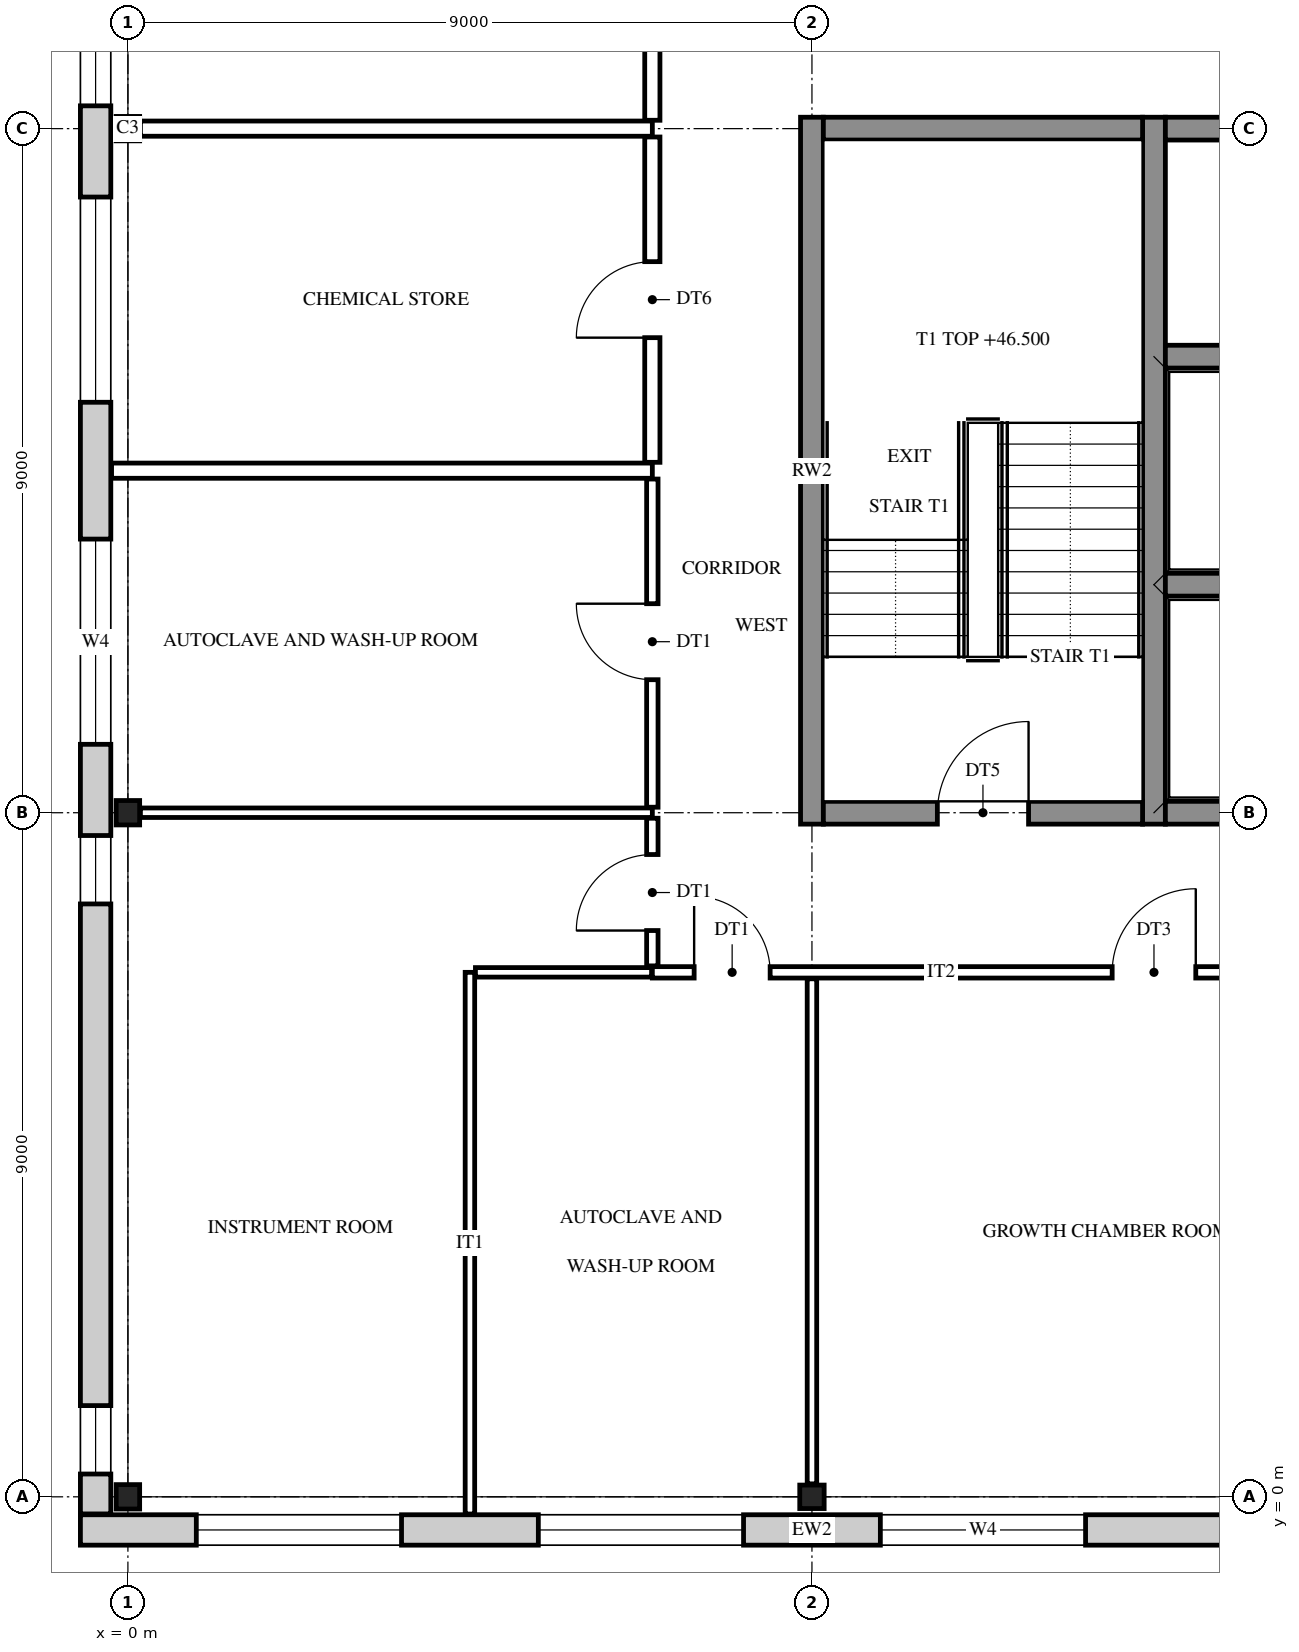
"""IFC4 building model, lengths in metres.
Left out: names, types, materials, properties, quantities, classifications, styles, units other than length and angle.
Written with IfcOpenShell. Run it as: python <this file> out.ifc"""

import sys

from ifc_helpers import new_model, si_unit, direction, frame, frame_2d, origin, origin_2d, place, context, subcontext, project, spatial, rectangle, i_section, extrude, element, fill, save


model = new_model("IFC4")
c1 = context("Model", 3, precision=1e-05, world=origin(), true_north=direction((0.0, 1.0)))
c2 = subcontext(c1, "Body", "Model", "MODEL_VIEW")
j1 = project(units=[si_unit("LENGTHUNIT", "METRE"), si_unit("PLANEANGLEUNIT", "RADIAN")], contexts=[c1])
p1 = place(None, origin())
s1 = spatial("IfcSite", under=j1, at=p1, CompositionType="ELEMENT")
p2 = place(p1, origin())
s2 = spatial("IfcBuilding", under=s1, at=p2, CompositionType="ELEMENT")
p3 = place(p2, frame((0.0, 0.0, 44.4)))
s3 = spatial("IfcBuildingStorey", under=s2, at=p3, CompositionType="ELEMENT", Elevation=44.4)
for number, where, z_axis, x_axis in (
    (1, (0.0, 0.0, 0.0), (0.0, 0.0, 1.0), (1.0, 0.0, 0.0)),
    (2, (0.0, 9.0, 0.0), (0.0, 0.0, 1.0), (1.0, 0.0, 0.0)),
    (3, (0.0, 18.0, 0.0), (0.0, 0.0, 1.0), (1.0, 0.0, 0.0)),
    (4, (9.0, 0.0, 0.0), (0.0, 0.0, 1.0), (0.0, 1.0, 0.0)),
):
    element("IfcColumn", number, at=place(p3, frame(where, z_axis=z_axis, x_axis=x_axis)), inside=s3, PredefinedType="COLUMN", context=c2, shape_type="SweptSolid", body=[
        extrude(i_section(OverallWidth=0.309, OverallDepth=0.321, WebThickness=0.014, FlangeThickness=0.022, FilletRadius=0.017, at=origin_2d()), origin(), (0.0, 0.0, 1.0), 4.2),
    ])
for number, where, z_axis, x_axis in (
    (5, (9.0, 8.85, 0.0), (0.0, 0.0, 1.0), (0.0, 1.0, 0.0)),
    (6, (13.5, 8.85, 0.0), (0.0, 0.0, 1.0), (0.0, 1.0, 0.0)),
):
    element("IfcWall", number, at=place(p3, frame(where, z_axis=z_axis, x_axis=x_axis)), inside=s3, PredefinedType="SHEAR", context=c2, shape_type="SweptSolid", body=[
        extrude(rectangle(XDim=9.3, YDim=0.3, at=frame_2d((4.65, 0.0))), origin(), (0.0, 0.0, 1.0), 4.2),
    ])
p4 = place(p3, frame((9.15, 9.0, 0.0), z_axis=(0.0, 0.0, 1.0), x_axis=(1.0, 0.0, 0.0)))
e7 = element("IfcWall", 7, at=p4, inside=s3, PredefinedType="SHEAR", context=c2, shape_type="SweptSolid", body=[
    extrude(rectangle(XDim=4.2, YDim=0.3, at=frame_2d((2.1, 0.0))), origin(), (0.0, 0.0, 1.0), 4.2),
])
p5 = place(p4, frame((1.5, 0.0, 0.0)))
e8 = element("IfcOpeningElement", 8, at=p5, cuts=e7, PredefinedType="OPENING", context=c2, shape_type="SweptSolid", body=[
    extrude(rectangle(XDim=1.2, YDim=2.1, at=frame_2d((0.6, 1.05))), frame((0.0, 0.16, 0.0), z_axis=(0.0, -1.0, 0.0), x_axis=(1.0, 0.0, 0.0)), (0.0, 0.0, 1.0), 0.32),
])
for number, where, z_axis, x_axis in (
    (9, (13.65, 9.0, 0.0), (0.0, 0.0, 1.0), (1.0, 0.0, 0.0)),
    (10, (13.65, 12.0, 0.0), (0.0, 0.0, 1.0), (1.0, 0.0, 0.0)),
    (11, (13.65, 15.0, 0.0), (0.0, 0.0, 1.0), (1.0, 0.0, 0.0)),
):
    element("IfcWall", number, at=place(p3, frame(where, z_axis=z_axis, x_axis=x_axis)), inside=s3, PredefinedType="SHEAR", context=c2, shape_type="SweptSolid", body=[
        extrude(rectangle(XDim=2.7, YDim=0.3, at=frame_2d((1.35, 0.0))), origin(), (0.0, 0.0, 1.0), 4.2),
    ])
p6 = place(p3, frame((9.15, 18.0, 0.0), z_axis=(0.0, 0.0, 1.0), x_axis=(1.0, 0.0, 0.0)))
e12 = element("IfcWall", 12, at=p6, inside=s3, PredefinedType="SHEAR", context=c2, shape_type="SweptSolid", body=[
    extrude(rectangle(XDim=4.2, YDim=0.3, at=frame_2d((2.1, 0.0))), origin(), (0.0, 0.0, 1.0), 4.2),
])
p7 = place(p3, frame((13.65, 18.0, 0.0), z_axis=(0.0, 0.0, 1.0), x_axis=(1.0, 0.0, 0.0)))
e13 = element("IfcWall", 13, at=p7, inside=s3, PredefinedType="SHEAR", context=c2, shape_type="SweptSolid", body=[
    extrude(rectangle(XDim=2.7, YDim=0.3, at=frame_2d((1.35, 0.0))), origin(), (0.0, 0.0, 1.0), 4.2),
])
p8 = place(p3, frame((32.125, -0.436, 0.0), z_axis=(0.0, 0.0, 1.0), x_axis=(-1.0, 0.0, 0.0)))
e14 = element("IfcWall", 14, at=p8, inside=s3, PredefinedType="STANDARD", context=c2, shape_type="SweptSolid", body=[
    extrude(rectangle(XDim=32.75, YDim=0.4, at=frame_2d((16.375, 0.0))), origin(), (0.0, 0.0, 1.0), 4.2),
])
p9 = place(p8, frame((28.525, 0.0, 0.9)))
e15 = element("IfcOpeningElement", 15, at=p9, cuts=e14, PredefinedType="OPENING", context=c2, shape_type="SweptSolid", body=[
    extrude(rectangle(XDim=2.7, YDim=2.5, at=frame_2d((1.35, 1.25))), frame((0.0, 0.21, 0.0), z_axis=(0.0, -1.0, 0.0), x_axis=(1.0, 0.0, 0.0)), (0.0, 0.0, 1.0), 0.42),
])
p10 = place(p8, frame((24.025, 0.0, 0.9)))
e16 = element("IfcOpeningElement", 16, at=p10, cuts=e14, PredefinedType="OPENING", context=c2, shape_type="SweptSolid", body=[
    extrude(rectangle(XDim=2.7, YDim=2.5, at=frame_2d((1.35, 1.25))), frame((0.0, 0.21, 0.0), z_axis=(0.0, -1.0, 0.0), x_axis=(1.0, 0.0, 0.0)), (0.0, 0.0, 1.0), 0.42),
])
p11 = place(p8, frame((19.525, 0.0, 0.9)))
e17 = element("IfcOpeningElement", 17, at=p11, cuts=e14, PredefinedType="OPENING", context=c2, shape_type="SweptSolid", body=[
    extrude(rectangle(XDim=2.7, YDim=2.5, at=frame_2d((1.35, 1.25))), frame((0.0, 0.21, 0.0), z_axis=(0.0, -1.0, 0.0), x_axis=(1.0, 0.0, 0.0)), (0.0, 0.0, 1.0), 0.42),
])
p12 = place(p8, frame((15.025, 0.0, 0.9)))
e18 = element("IfcOpeningElement", 18, at=p12, cuts=e14, PredefinedType="OPENING", context=c2, shape_type="SweptSolid", body=[
    extrude(rectangle(XDim=2.7, YDim=2.5, at=frame_2d((1.35, 1.25))), frame((0.0, 0.21, 0.0), z_axis=(0.0, -1.0, 0.0), x_axis=(1.0, 0.0, 0.0)), (0.0, 0.0, 1.0), 0.42),
])
p13 = place(p8, frame((10.525, 0.0, 0.9)))
e19 = element("IfcOpeningElement", 19, at=p13, cuts=e14, PredefinedType="OPENING", context=c2, shape_type="SweptSolid", body=[
    extrude(rectangle(XDim=2.7, YDim=2.5, at=frame_2d((1.35, 1.25))), frame((0.0, 0.21, 0.0), z_axis=(0.0, -1.0, 0.0), x_axis=(1.0, 0.0, 0.0)), (0.0, 0.0, 1.0), 0.42),
])
p14 = place(p8, frame((6.025, 0.0, 0.9)))
e20 = element("IfcOpeningElement", 20, at=p14, cuts=e14, PredefinedType="OPENING", context=c2, shape_type="SweptSolid", body=[
    extrude(rectangle(XDim=2.7, YDim=2.5, at=frame_2d((1.35, 1.25))), frame((0.0, 0.21, 0.0), z_axis=(0.0, -1.0, 0.0), x_axis=(1.0, 0.0, 0.0)), (0.0, 0.0, 1.0), 0.42),
])
p15 = place(p8, frame((1.525, 0.0, 0.9)))
e21 = element("IfcOpeningElement", 21, at=p15, cuts=e14, PredefinedType="OPENING", context=c2, shape_type="SweptSolid", body=[
    extrude(rectangle(XDim=2.7, YDim=2.5, at=frame_2d((1.35, 1.25))), frame((0.0, 0.21, 0.0), z_axis=(0.0, -1.0, 0.0), x_axis=(1.0, 0.0, 0.0)), (0.0, 0.0, 1.0), 0.42),
])
p16 = place(p3, frame((-0.425, -0.225, 0.0), z_axis=(0.0, 0.0, 1.0), x_axis=(0.0, 1.0, 0.0)))
e22 = element("IfcWall", 22, at=p16, inside=s3, PredefinedType="STANDARD", context=c2, shape_type="SweptSolid", body=[
    extrude(rectangle(XDim=27.45, YDim=0.4, at=frame_2d((13.725, 0.0))), origin(), (0.0, 0.0, 1.0), 4.2),
])
p17 = place(p16, frame((0.525, 0.0, 0.9)))
e23 = element("IfcOpeningElement", 23, at=p17, cuts=e22, PredefinedType="OPENING", context=c2, shape_type="SweptSolid", body=[
    extrude(rectangle(XDim=0.9, YDim=2.0, at=frame_2d((0.45, 1.0))), frame((0.0, 0.21, 0.0), z_axis=(0.0, -1.0, 0.0), x_axis=(1.0, 0.0, 0.0)), (0.0, 0.0, 1.0), 0.42),
])
p18 = place(p16, frame((8.025, 0.0, 0.9)))
e24 = element("IfcOpeningElement", 24, at=p18, cuts=e22, PredefinedType="OPENING", context=c2, shape_type="SweptSolid", body=[
    extrude(rectangle(XDim=0.9, YDim=2.0, at=frame_2d((0.45, 1.0))), frame((0.0, 0.21, 0.0), z_axis=(0.0, -1.0, 0.0), x_axis=(1.0, 0.0, 0.0)), (0.0, 0.0, 1.0), 0.42),
])
p19 = place(p16, frame((10.125, 0.0, 0.9)))
e25 = element("IfcOpeningElement", 25, at=p19, cuts=e22, PredefinedType="OPENING", context=c2, shape_type="SweptSolid", body=[
    extrude(rectangle(XDim=2.7, YDim=2.5, at=frame_2d((1.35, 1.25))), frame((0.0, 0.21, 0.0), z_axis=(0.0, -1.0, 0.0), x_axis=(1.0, 0.0, 0.0)), (0.0, 0.0, 1.0), 0.42),
])
p20 = place(p16, frame((14.625, 0.0, 0.9)))
e26 = element("IfcOpeningElement", 26, at=p20, cuts=e22, PredefinedType="OPENING", context=c2, shape_type="SweptSolid", body=[
    extrude(rectangle(XDim=2.7, YDim=2.5, at=frame_2d((1.35, 1.25))), frame((0.0, 0.21, 0.0), z_axis=(0.0, -1.0, 0.0), x_axis=(1.0, 0.0, 0.0)), (0.0, 0.0, 1.0), 0.42),
])
p21 = place(p16, frame((18.525, 0.0, 0.9)))
e27 = element("IfcOpeningElement", 27, at=p21, cuts=e22, PredefinedType="OPENING", context=c2, shape_type="SweptSolid", body=[
    extrude(rectangle(XDim=0.9, YDim=2.0, at=frame_2d((0.45, 1.0))), frame((0.0, 0.21, 0.0), z_axis=(0.0, -1.0, 0.0), x_axis=(1.0, 0.0, 0.0)), (0.0, 0.0, 1.0), 0.42),
])
p22 = place(p16, frame((26.025, 0.0, 0.9)))
e28 = element("IfcOpeningElement", 28, at=p22, cuts=e22, PredefinedType="OPENING", context=c2, shape_type="SweptSolid", body=[
    extrude(rectangle(XDim=0.9, YDim=2.0, at=frame_2d((0.45, 1.0))), frame((0.0, 0.21, 0.0), z_axis=(0.0, -1.0, 0.0), x_axis=(1.0, 0.0, 0.0)), (0.0, 0.0, 1.0), 0.42),
])
p23 = place(p3, frame((4.5, -0.226, 0.0), z_axis=(0.0, 0.0, 1.0), x_axis=(0.0, 1.0, 0.0)))
e29 = element("IfcWall", 29, at=p23, inside=s3, PredefinedType="PARTITIONING", context=c2, shape_type="SweptSolid", body=[
    extrude(rectangle(XDim=7.126, YDim=0.125, at=frame_2d((3.563, 0.0))), origin(), (0.0, 0.0, 1.0), 3.542),
])
p24 = place(p3, frame((6.9, 6.985, 0.0), z_axis=(0.0, 0.0, 1.0), x_axis=(0.0, 1.0, 0.0)))
e30 = element("IfcWall", 30, at=p24, inside=s3, PredefinedType="PARTITIONING", context=c2, shape_type="SweptSolid", body=[
    extrude(rectangle(XDim=1.942, YDim=0.15, at=frame_2d((0.971, 0.0))), origin(), (0.0, 0.0, 1.0), 3.542),
])
p25 = place(p24, frame((0.465, 0.0, 0.0)))
e31 = element("IfcOpeningElement", 31, at=p25, cuts=e30, PredefinedType="OPENING", context=c2, shape_type="SweptSolid", body=[
    extrude(rectangle(XDim=1.0, YDim=2.1, at=frame_2d((0.5, 1.05))), frame((0.0, 0.085, 0.0), z_axis=(0.0, -1.0, 0.0), x_axis=(1.0, 0.0, 0.0)), (0.0, 0.0, 1.0), 0.17),
])
p26 = place(p3, frame((6.9, 9.073, 0.0), z_axis=(0.0, 0.0, 1.0), x_axis=(0.0, 1.0, 0.0)))
e32 = element("IfcWall", 32, at=p26, inside=s3, PredefinedType="PARTITIONING", context=c2, shape_type="SweptSolid", body=[
    extrude(rectangle(XDim=4.317, YDim=0.15, at=frame_2d((2.159, 0.0))), origin(), (0.0, 0.0, 1.0), 3.542),
])
p27 = place(p26, frame((1.677, 0.0, 0.0)))
e33 = element("IfcOpeningElement", 33, at=p27, cuts=e32, PredefinedType="OPENING", context=c2, shape_type="SweptSolid", body=[
    extrude(rectangle(XDim=1.0, YDim=2.1, at=frame_2d((0.5, 1.05))), frame((0.0, 0.085, 0.0), z_axis=(0.0, -1.0, 0.0), x_axis=(1.0, 0.0, 0.0)), (0.0, 0.0, 1.0), 0.17),
])
p28 = place(p3, frame((6.9, 13.61, 0.0), z_axis=(0.0, 0.0, 1.0), x_axis=(0.0, 1.0, 0.0)))
e34 = element("IfcWall", 34, at=p28, inside=s3, PredefinedType="PARTITIONING", context=c2, shape_type="SweptSolid", body=[
    extrude(rectangle(XDim=4.28, YDim=0.2, at=frame_2d((2.14, 0.0))), origin(), (0.0, 0.0, 1.0), 3.542),
])
p29 = place(p28, frame((1.64, 0.0, 0.0)))
e35 = element("IfcOpeningElement", 35, at=p29, cuts=e34, PredefinedType="OPENING", context=c2, shape_type="SweptSolid", body=[
    extrude(rectangle(XDim=1.0, YDim=2.1, at=frame_2d((0.5, 1.05))), frame((0.0, 0.11, 0.0), z_axis=(0.0, -1.0, 0.0), x_axis=(1.0, 0.0, 0.0)), (0.0, 0.0, 1.0), 0.22),
])
p30 = place(p3, frame((6.9, 18.11, 0.0), z_axis=(0.0, 0.0, 1.0), x_axis=(0.0, 1.0, 0.0)))
e36 = element("IfcWall", 36, at=p30, inside=s3, PredefinedType="PARTITIONING", context=c2, shape_type="SweptSolid", body=[
    extrude(rectangle(XDim=1.88, YDim=0.2, at=frame_2d((0.94, 0.0))), origin(), (0.0, 0.0, 1.0), 3.542),
])
p31 = place(p3, frame((9.0, 0.17, 0.0), z_axis=(0.0, 0.0, 1.0), x_axis=(0.0, 1.0, 0.0)))
e37 = element("IfcWall", 37, at=p31, inside=s3, PredefinedType="PARTITIONING", context=c2, shape_type="SweptSolid", body=[
    extrude(rectangle(XDim=6.645, YDim=0.125, at=frame_2d((3.322, 0.0))), origin(), (0.0, 0.0, 1.0), 3.542),
])
p32 = place(p3, frame((4.573, 6.9, 0.0), z_axis=(0.0, 0.0, 1.0), x_axis=(1.0, 0.0, 0.0)))
e38 = element("IfcWall", 38, at=p32, inside=s3, PredefinedType="PARTITIONING", context=c2, shape_type="SweptSolid", body=[
    extrude(rectangle(XDim=2.317, YDim=0.125, at=frame_2d((1.159, 0.0))), origin(), (0.0, 0.0, 1.0), 3.542),
])
p33 = place(p3, frame((6.9, 6.9, 0.0), z_axis=(0.0, 0.0, 1.0), x_axis=(1.0, 0.0, 0.0)))
e39 = element("IfcWall", 39, at=p33, inside=s3, PredefinedType="PARTITIONING", context=c2, shape_type="SweptSolid", body=[
    extrude(rectangle(XDim=11.1, YDim=0.15, at=frame_2d((5.55, 0.0))), origin(), (0.0, 0.0, 1.0), 3.542),
])
p34 = place(p33, frame((0.55, 0.0, 0.0)))
e40 = element("IfcOpeningElement", 40, at=p34, cuts=e39, PredefinedType="OPENING", context=c2, shape_type="SweptSolid", body=[
    extrude(rectangle(XDim=1.0, YDim=2.1, at=frame_2d((0.5, 1.05))), frame((0.0, 0.085, 0.0), z_axis=(0.0, -1.0, 0.0), x_axis=(1.0, 0.0, 0.0)), (0.0, 0.0, 1.0), 0.17),
])
p35 = place(p33, frame((6.05, 0.0, 0.0)))
e41 = element("IfcOpeningElement", 41, at=p35, cuts=e39, PredefinedType="OPENING", context=c2, shape_type="SweptSolid", body=[
    extrude(rectangle(XDim=1.1, YDim=2.1, at=frame_2d((0.55, 1.05))), frame((0.0, 0.085, 0.0), z_axis=(0.0, -1.0, 0.0), x_axis=(1.0, 0.0, 0.0)), (0.0, 0.0, 1.0), 0.17),
])
p36 = place(p3, frame((0.165, 9.0, 0.0), z_axis=(0.0, 0.0, 1.0), x_axis=(1.0, 0.0, 0.0)))
e42 = element("IfcWall", 42, at=p36, inside=s3, PredefinedType="PARTITIONING", context=c2, shape_type="SweptSolid", body=[
    extrude(rectangle(XDim=6.735, YDim=0.125, at=frame_2d((3.368, 0.0))), origin(), (0.0, 0.0, 1.0), 3.542),
])
p37 = place(p3, frame((-0.215, 13.5, 0.0), z_axis=(0.0, 0.0, 1.0), x_axis=(1.0, 0.0, 0.0)))
e43 = element("IfcWall", 43, at=p37, inside=s3, PredefinedType="PARTITIONING", context=c2, shape_type="SweptSolid", body=[
    extrude(rectangle(XDim=7.115, YDim=0.2, at=frame_2d((3.558, 0.0))), origin(), (0.0, 0.0, 1.0), 3.542),
])
p38 = place(p3, frame((0.165, 18.0, 0.0), z_axis=(0.0, 0.0, 1.0), x_axis=(1.0, 0.0, 0.0)))
e44 = element("IfcWall", 44, at=p38, inside=s3, PredefinedType="PARTITIONING", context=c2, shape_type="SweptSolid", body=[
    extrude(rectangle(XDim=6.735, YDim=0.2, at=frame_2d((3.368, 0.0))), origin(), (0.0, 0.0, 1.0), 3.542),
])
p39 = place(p9, origin())
e45 = element("IfcWindow", 45, at=p39, inside=s3, PartitioningType="SINGLE_PANEL", PredefinedType="WINDOW", context=c2, shape_type="SweptSolid", body=[
    extrude(rectangle(XDim=2.7, YDim=2.5, at=frame_2d((1.35, 1.25))), frame((0.0, 0.03, 0.0), z_axis=(0.0, -1.0, 0.0), x_axis=(1.0, 0.0, 0.0)), (0.0, 0.0, 1.0), 0.06),
])
fill(e15, e45)
p40 = place(p10, origin())
e46 = element("IfcWindow", 46, at=p40, inside=s3, PartitioningType="SINGLE_PANEL", PredefinedType="WINDOW", context=c2, shape_type="SweptSolid", body=[
    extrude(rectangle(XDim=2.7, YDim=2.5, at=frame_2d((1.35, 1.25))), frame((0.0, 0.03, 0.0), z_axis=(0.0, -1.0, 0.0), x_axis=(1.0, 0.0, 0.0)), (0.0, 0.0, 1.0), 0.06),
])
fill(e16, e46)
p41 = place(p11, origin())
e47 = element("IfcWindow", 47, at=p41, inside=s3, PartitioningType="SINGLE_PANEL", PredefinedType="WINDOW", context=c2, shape_type="SweptSolid", body=[
    extrude(rectangle(XDim=2.7, YDim=2.5, at=frame_2d((1.35, 1.25))), frame((0.0, 0.03, 0.0), z_axis=(0.0, -1.0, 0.0), x_axis=(1.0, 0.0, 0.0)), (0.0, 0.0, 1.0), 0.06),
])
fill(e17, e47)
p42 = place(p17, origin())
e48 = element("IfcWindow", 48, at=p42, inside=s3, PartitioningType="SINGLE_PANEL", PredefinedType="WINDOW", context=c2, shape_type="SweptSolid", body=[
    extrude(rectangle(XDim=0.9, YDim=2.0, at=frame_2d((0.45, 1.0))), frame((0.0, 0.03, 0.0), z_axis=(0.0, -1.0, 0.0), x_axis=(1.0, 0.0, 0.0)), (0.0, 0.0, 1.0), 0.06),
])
fill(e23, e48)
p43 = place(p18, origin())
e49 = element("IfcWindow", 49, at=p43, inside=s3, PartitioningType="SINGLE_PANEL", PredefinedType="WINDOW", context=c2, shape_type="SweptSolid", body=[
    extrude(rectangle(XDim=0.9, YDim=2.0, at=frame_2d((0.45, 1.0))), frame((0.0, 0.03, 0.0), z_axis=(0.0, -1.0, 0.0), x_axis=(1.0, 0.0, 0.0)), (0.0, 0.0, 1.0), 0.06),
])
fill(e24, e49)
p44 = place(p19, origin())
e50 = element("IfcWindow", 50, at=p44, inside=s3, PartitioningType="SINGLE_PANEL", PredefinedType="WINDOW", context=c2, shape_type="SweptSolid", body=[
    extrude(rectangle(XDim=2.7, YDim=2.5, at=frame_2d((1.35, 1.25))), frame((0.0, 0.03, 0.0), z_axis=(0.0, -1.0, 0.0), x_axis=(1.0, 0.0, 0.0)), (0.0, 0.0, 1.0), 0.06),
])
fill(e25, e50)
p45 = place(p20, origin())
e51 = element("IfcWindow", 51, at=p45, inside=s3, PartitioningType="SINGLE_PANEL", PredefinedType="WINDOW", context=c2, shape_type="SweptSolid", body=[
    extrude(rectangle(XDim=2.7, YDim=2.5, at=frame_2d((1.35, 1.25))), frame((0.0, 0.03, 0.0), z_axis=(0.0, -1.0, 0.0), x_axis=(1.0, 0.0, 0.0)), (0.0, 0.0, 1.0), 0.06),
])
fill(e26, e51)
p46 = place(p21, origin())
e52 = element("IfcWindow", 52, at=p46, inside=s3, PartitioningType="SINGLE_PANEL", PredefinedType="WINDOW", context=c2, shape_type="SweptSolid", body=[
    extrude(rectangle(XDim=0.9, YDim=2.0, at=frame_2d((0.45, 1.0))), frame((0.0, 0.03, 0.0), z_axis=(0.0, -1.0, 0.0), x_axis=(1.0, 0.0, 0.0)), (0.0, 0.0, 1.0), 0.06),
])
fill(e27, e52)
p47 = place(p5, origin())
e53 = element("IfcDoor", 53, at=p47, inside=s3, OperationType="SINGLE_SWING_RIGHT", PredefinedType="DOOR", context=c2, shape_type="SweptSolid", body=[
    extrude(rectangle(XDim=1.2, YDim=2.1, at=frame_2d((0.6, 1.05))), frame((0.0, 0.025, 0.0), z_axis=(0.0, -1.0, 0.0), x_axis=(1.0, 0.0, 0.0)), (0.0, 0.0, 1.0), 0.05),
])
fill(e8, e53)
p48 = place(p25, origin())
e54 = element("IfcDoor", 54, at=p48, inside=s3, OperationType="SINGLE_SWING_LEFT", PredefinedType="DOOR", context=c2, shape_type="SweptSolid", body=[
    extrude(rectangle(XDim=1.0, YDim=2.1, at=frame_2d((0.5, 1.05))), frame((0.0, 0.025, 0.0), z_axis=(0.0, -1.0, 0.0), x_axis=(1.0, 0.0, 0.0)), (0.0, 0.0, 1.0), 0.05),
])
fill(e31, e54)
p49 = place(p34, frame((1.0, 0.0, 0.0), z_axis=(0.0, 0.0, 1.0), x_axis=(-1.0, 0.0, 0.0)))
e55 = element("IfcDoor", 55, at=p49, inside=s3, OperationType="SINGLE_SWING_LEFT", PredefinedType="DOOR", context=c2, shape_type="SweptSolid", body=[
    extrude(rectangle(XDim=1.0, YDim=2.1, at=frame_2d((0.5, 1.05))), frame((0.0, 0.025, 0.0), z_axis=(0.0, -1.0, 0.0), x_axis=(1.0, 0.0, 0.0)), (0.0, 0.0, 1.0), 0.05),
])
fill(e40, e55)
p50 = place(p35, frame((1.1, 0.0, 0.0), z_axis=(0.0, 0.0, 1.0), x_axis=(-1.0, 0.0, 0.0)))
e56 = element("IfcDoor", 56, at=p50, inside=s3, OperationType="SINGLE_SWING_RIGHT", PredefinedType="DOOR", context=c2, shape_type="SweptSolid", body=[
    extrude(rectangle(XDim=1.1, YDim=2.1, at=frame_2d((0.55, 1.05))), frame((0.0, 0.025, 0.0), z_axis=(0.0, -1.0, 0.0), x_axis=(1.0, 0.0, 0.0)), (0.0, 0.0, 1.0), 0.05),
])
fill(e41, e56)
p51 = place(p27, origin())
e57 = element("IfcDoor", 57, at=p51, inside=s3, OperationType="SINGLE_SWING_RIGHT", PredefinedType="DOOR", context=c2, shape_type="SweptSolid", body=[
    extrude(rectangle(XDim=1.0, YDim=2.1, at=frame_2d((0.5, 1.05))), frame((0.0, 0.025, 0.0), z_axis=(0.0, -1.0, 0.0), x_axis=(1.0, 0.0, 0.0)), (0.0, 0.0, 1.0), 0.05),
])
fill(e33, e57)
p52 = place(p29, origin())
e58 = element("IfcDoor", 58, at=p52, inside=s3, OperationType="SINGLE_SWING_LEFT", PredefinedType="DOOR", context=c2, shape_type="SweptSolid", body=[
    extrude(rectangle(XDim=1.0, YDim=2.1, at=frame_2d((0.5, 1.05))), frame((0.0, 0.025, 0.0), z_axis=(0.0, -1.0, 0.0), x_axis=(1.0, 0.0, 0.0)), (0.0, 0.0, 1.0), 0.05),
])
fill(e35, e58)
save(model, sys.argv[1])
